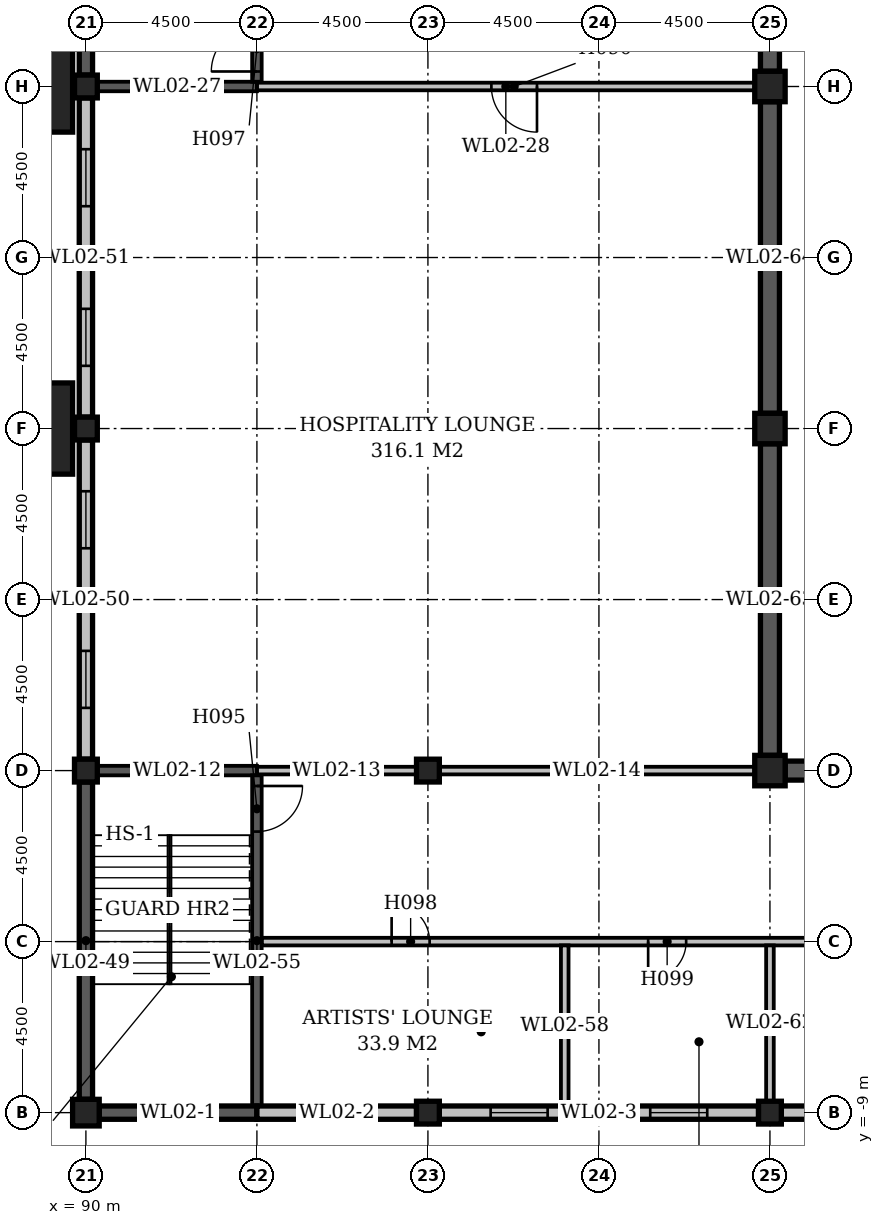
"""IFC4 building model, lengths in metres.
Left out: names, types, materials, properties, quantities, classifications, styles, units other than length and angle.
Written with IfcOpenShell. Run it as: python <this file> out.ifc"""

import sys

from ifc_helpers import new_model, si_unit, direction, frame, frame_2d, origin, origin_2d, place, context, subcontext, project, spatial, rectangle, extrude, element, fill, save


model = new_model("IFC4")
c1 = context("Model", 3, precision=1e-05, world=origin(), true_north=direction((0.0, 1.0)))
c2 = subcontext(c1, "Body", "Model", "MODEL_VIEW")
j1 = project(units=[si_unit("LENGTHUNIT", "METRE"), si_unit("PLANEANGLEUNIT", "RADIAN")], contexts=[c1])
p1 = place(None, origin())
s1 = spatial("IfcSite", under=j1, at=p1, CompositionType="ELEMENT")
p2 = place(p1, origin())
s2 = spatial("IfcBuilding", under=s1, at=p2, CompositionType="ELEMENT")
p3 = place(p2, frame((0.0, 0.0, 14.0)))
s3 = spatial("IfcBuildingStorey", under=s2, at=p3, CompositionType="ELEMENT", Elevation=14.0)
p4 = place(p3, frame((90.0, -9.0, 0.0), z_axis=(0.0, 0.0, 1.0), x_axis=(1.0, 0.0, 0.0)))
e1 = element("IfcColumn", 1, at=p4, inside=s3, PredefinedType="COLUMN", context=c2, shape_type="SweptSolid", body=[
    extrude(rectangle(XDim=0.7, YDim=0.7, at=origin_2d()), origin(), (0.0, 0.0, 1.0), 4.7),
])
for number, where, z_axis, x_axis in (
    (2, (90.0, 0.0, 0.0), (0.0, 0.0, 1.0), (1.0, 0.0, 0.0)),
    (3, (90.0, 9.0, 0.0), (0.0, 0.0, 1.0), (1.0, 0.0, 0.0)),
    (4, (90.0, 18.0, 0.0), (0.0, 0.0, 1.0), (1.0, 0.0, 0.0)),
    (5, (99.0, -9.0, 0.0), (0.0, 0.0, 1.0), (1.0, 0.0, 0.0)),
    (6, (99.0, 0.0, 0.0), (0.0, 0.0, 1.0), (1.0, 0.0, 0.0)),
    (7, (108.0, -9.0, 0.0), (0.0, 0.0, 1.0), (1.0, 0.0, 0.0)),
):
    element("IfcColumn", number, at=place(p3, frame(where, z_axis=z_axis, x_axis=x_axis)), inside=s3, PredefinedType="COLUMN", context=c2, shape_type="SweptSolid", body=[
        extrude(rectangle(XDim=0.6, YDim=0.6, at=origin_2d()), origin(), (0.0, 0.0, 1.0), 4.7),
    ])
for number, where, z_axis, x_axis in (
    (8, (108.0, 0.0, -0.3), (0.0, 0.0, 1.0), (1.0, 0.0, 0.0)),
    (9, (108.0, 9.0, -0.3), (0.0, 0.0, 1.0), (1.0, 0.0, 0.0)),
    (10, (108.0, 18.0, -0.3), (0.0, 0.0, 1.0), (1.0, 0.0, 0.0)),
):
    element("IfcColumn", number, at=place(p3, frame(where, z_axis=z_axis, x_axis=x_axis)), inside=s3, PredefinedType="COLUMN", context=c2, shape_type="SweptSolid", body=[
        extrude(rectangle(XDim=0.8, YDim=0.8, at=origin_2d()), origin(), (0.0, 0.0, 1.0), 5.0),
    ])
p5 = place(p3, frame((90.35, -9.0, 0.0), z_axis=(0.0, 0.0, 1.0), x_axis=(1.0, 0.0, 0.0)))
e11 = element("IfcWall", 11, at=p5, inside=s3, PredefinedType="STANDARD", context=c2, shape_type="SweptSolid", body=[
    extrude(rectangle(XDim=4.15, YDim=0.35, at=frame_2d((2.075, 0.0))), origin(), (0.0, 0.0, 1.0), 5.0),
])
p6 = place(p3, frame((94.5, -9.0, 0.0), z_axis=(0.0, 0.0, 1.0), x_axis=(1.0, 0.0, 0.0)))
e12 = element("IfcWall", 12, at=p6, inside=s3, PredefinedType="STANDARD", context=c2, shape_type="SweptSolid", body=[
    extrude(rectangle(XDim=4.2, YDim=0.35, at=frame_2d((2.1, 0.0))), origin(), (0.0, 0.0, 1.0), 4.1),
])
p7 = place(p6, frame((1.35, 0.0, 1.0)))
e13 = element("IfcOpeningElement", 13, at=p7, cuts=e12, PredefinedType="OPENING", context=c2, shape_type="SweptSolid", body=[
    extrude(rectangle(XDim=1.5, YDim=2.4, at=frame_2d((0.75, 1.2))), frame((0.0, 0.187, 0.0), z_axis=(0.0, -1.0, 0.0), x_axis=(1.0, 0.0, 0.0)), (0.0, 0.0, 1.0), 0.374),
])
p8 = place(p3, frame((99.3, -9.0, 0.0), z_axis=(0.0, 0.0, 1.0), x_axis=(1.0, 0.0, 0.0)))
e14 = element("IfcWall", 14, at=p8, inside=s3, PredefinedType="STANDARD", context=c2, shape_type="SweptSolid", body=[
    extrude(rectangle(XDim=8.4, YDim=0.35, at=frame_2d((4.2, 0.0))), origin(), (0.0, 0.0, 1.0), 4.1),
])
p9 = place(p8, frame((1.35, 0.0, 1.0)))
e15 = element("IfcOpeningElement", 15, at=p9, cuts=e14, PredefinedType="OPENING", context=c2, shape_type="SweptSolid", body=[
    extrude(rectangle(XDim=1.5, YDim=2.4, at=frame_2d((0.75, 1.2))), frame((0.0, 0.187, 0.0), z_axis=(0.0, -1.0, 0.0), x_axis=(1.0, 0.0, 0.0)), (0.0, 0.0, 1.0), 0.374),
])
p10 = place(p8, frame((5.55, 0.0, 1.0)))
e16 = element("IfcOpeningElement", 16, at=p10, cuts=e14, PredefinedType="OPENING", context=c2, shape_type="SweptSolid", body=[
    extrude(rectangle(XDim=1.5, YDim=2.4, at=frame_2d((0.75, 1.2))), frame((0.0, 0.187, 0.0), z_axis=(0.0, -1.0, 0.0), x_axis=(1.0, 0.0, 0.0)), (0.0, 0.0, 1.0), 0.374),
])
p11 = place(p3, frame((108.3, -9.0, 0.0), z_axis=(0.0, 0.0, 1.0), x_axis=(1.0, 0.0, 0.0)))
e17 = element("IfcWall", 17, at=p11, inside=s3, PredefinedType="STANDARD", context=c2, shape_type="SweptSolid", body=[
    extrude(rectangle(XDim=8.4, YDim=0.35, at=frame_2d((4.2, 0.0))), origin(), (0.0, 0.0, 1.0), 4.1),
])
p12 = place(p11, frame((1.35, 0.0, 1.0)))
e18 = element("IfcOpeningElement", 18, at=p12, cuts=e17, PredefinedType="OPENING", context=c2, shape_type="SweptSolid", body=[
    extrude(rectangle(XDim=1.5, YDim=2.4, at=frame_2d((0.75, 1.2))), frame((0.0, 0.187, 0.0), z_axis=(0.0, -1.0, 0.0), x_axis=(1.0, 0.0, 0.0)), (0.0, 0.0, 1.0), 0.374),
])
p13 = place(p11, frame((5.55, 0.0, 1.0)))
e19 = element("IfcOpeningElement", 19, at=p13, cuts=e17, PredefinedType="OPENING", context=c2, shape_type="SweptSolid", body=[
    extrude(rectangle(XDim=1.5, YDim=2.4, at=frame_2d((0.75, 1.2))), frame((0.0, 0.187, 0.0), z_axis=(0.0, -1.0, 0.0), x_axis=(1.0, 0.0, 0.0)), (0.0, 0.0, 1.0), 0.374),
])
p14 = place(p3, frame((94.625, -4.5, 0.0), z_axis=(0.0, 0.0, 1.0), x_axis=(1.0, 0.0, 0.0)))
e20 = element("IfcWall", 20, at=p14, inside=s3, PredefinedType="STANDARD", context=c2, shape_type="SweptSolid", body=[
    extrude(rectangle(XDim=44.875, YDim=0.2, at=frame_2d((22.438, 0.0))), origin(), (0.0, 0.0, 1.0), 4.7),
])
p15 = place(p14, frame((3.42, 0.0, 0.0)))
e21 = element("IfcOpeningElement", 21, at=p15, cuts=e20, PredefinedType="OPENING", context=c2, shape_type="SweptSolid", body=[
    extrude(rectangle(XDim=1.0, YDim=2.1, at=frame_2d((0.5, 1.05))), frame((0.0, 0.112, 0.0), z_axis=(0.0, -1.0, 0.0), x_axis=(1.0, 0.0, 0.0)), (0.0, 0.0, 1.0), 0.224),
])
p16 = place(p14, frame((10.17, 0.0, 0.0)))
e22 = element("IfcOpeningElement", 22, at=p16, cuts=e20, PredefinedType="OPENING", context=c2, shape_type="SweptSolid", body=[
    extrude(rectangle(XDim=1.0, YDim=2.1, at=frame_2d((0.5, 1.05))), frame((0.0, 0.112, 0.0), z_axis=(0.0, -1.0, 0.0), x_axis=(1.0, 0.0, 0.0)), (0.0, 0.0, 1.0), 0.224),
])
p17 = place(p14, frame((17.17, 0.0, 0.0)))
e23 = element("IfcOpeningElement", 23, at=p17, cuts=e20, PredefinedType="OPENING", context=c2, shape_type="SweptSolid", body=[
    extrude(rectangle(XDim=1.0, YDim=2.1, at=frame_2d((0.5, 1.05))), frame((0.0, 0.112, 0.0), z_axis=(0.0, -1.0, 0.0), x_axis=(1.0, 0.0, 0.0)), (0.0, 0.0, 1.0), 0.224),
])
p18 = place(p14, frame((24.82, 0.0, 0.0)))
e24 = element("IfcOpeningElement", 24, at=p18, cuts=e20, PredefinedType="OPENING", context=c2, shape_type="SweptSolid", body=[
    extrude(rectangle(XDim=1.0, YDim=2.1, at=frame_2d((0.5, 1.05))), frame((0.0, 0.112, 0.0), z_axis=(0.0, -1.0, 0.0), x_axis=(1.0, 0.0, 0.0)), (0.0, 0.0, 1.0), 0.224),
])
p19 = place(p14, frame((29.37, 0.0, 0.0)))
e25 = element("IfcOpeningElement", 25, at=p19, cuts=e20, PredefinedType="OPENING", context=c2, shape_type="SweptSolid", body=[
    extrude(rectangle(XDim=1.0, YDim=2.1, at=frame_2d((0.5, 1.05))), frame((0.0, 0.112, 0.0), z_axis=(0.0, -1.0, 0.0), x_axis=(1.0, 0.0, 0.0)), (0.0, 0.0, 1.0), 0.224),
])
p20 = place(p14, frame((33.87, 0.0, 0.0)))
e26 = element("IfcOpeningElement", 26, at=p20, cuts=e20, PredefinedType="OPENING", context=c2, shape_type="SweptSolid", body=[
    extrude(rectangle(XDim=1.0, YDim=2.1, at=frame_2d((0.5, 1.05))), frame((0.0, 0.112, 0.0), z_axis=(0.0, -1.0, 0.0), x_axis=(1.0, 0.0, 0.0)), (0.0, 0.0, 1.0), 0.224),
])
p21 = place(p14, frame((38.52, 0.0, 0.0)))
e27 = element("IfcOpeningElement", 27, at=p21, cuts=e20, PredefinedType="OPENING", context=c2, shape_type="SweptSolid", body=[
    extrude(rectangle(XDim=1.0, YDim=2.1, at=frame_2d((0.5, 1.05))), frame((0.0, 0.112, 0.0), z_axis=(0.0, -1.0, 0.0), x_axis=(1.0, 0.0, 0.0)), (0.0, 0.0, 1.0), 0.224),
])
p22 = place(p3, frame((90.3, 0.0, 0.0), z_axis=(0.0, 0.0, 1.0), x_axis=(1.0, 0.0, 0.0)))
e28 = element("IfcWall", 28, at=p22, inside=s3, PredefinedType="STANDARD", context=c2, shape_type="SweptSolid", body=[
    extrude(rectangle(XDim=4.2, YDim=0.25, at=frame_2d((2.1, 0.0))), origin(), (0.0, 0.0, 1.0), 5.0),
])
p23 = place(p3, frame((94.5, 0.0, 0.0), z_axis=(0.0, 0.0, 1.0), x_axis=(1.0, 0.0, 0.0)))
e29 = element("IfcWall", 29, at=p23, inside=s3, PredefinedType="STANDARD", context=c2, shape_type="SweptSolid", body=[
    extrude(rectangle(XDim=4.2, YDim=0.2, at=frame_2d((2.1, 0.0))), origin(), (0.0, 0.0, 1.0), 4.7),
])
p24 = place(p3, frame((99.3, 0.0, 0.0), z_axis=(0.0, 0.0, 1.0), x_axis=(1.0, 0.0, 0.0)))
e30 = element("IfcWall", 30, at=p24, inside=s3, PredefinedType="STANDARD", context=c2, shape_type="SweptSolid", body=[
    extrude(rectangle(XDim=8.3, YDim=0.2, at=frame_2d((4.15, 0.0))), origin(), (0.0, 0.0, 1.0), 4.7),
])
p25 = place(p3, frame((108.4, 0.0, 0.0), z_axis=(0.0, 0.0, 1.0), x_axis=(1.0, 0.0, 0.0)))
e31 = element("IfcWall", 31, at=p25, inside=s3, PredefinedType="STANDARD", context=c2, shape_type="SweptSolid", body=[
    extrude(rectangle(XDim=8.3, YDim=0.5, at=frame_2d((4.15, 0.0))), origin(), (0.0, 0.0, 1.0), 5.0),
])
p26 = place(p25, frame((4.72, 0.0, 0.0)))
e32 = element("IfcOpeningElement", 32, at=p26, cuts=e31, PredefinedType="OPENING", context=c2, shape_type="SweptSolid", body=[
    extrude(rectangle(XDim=1.8, YDim=2.4, at=frame_2d((0.9, 1.2))), frame((0.0, 0.262, 0.0), z_axis=(0.0, -1.0, 0.0), x_axis=(1.0, 0.0, 0.0)), (0.0, 0.0, 1.0), 0.524),
])
p27 = place(p3, frame((90.3, 18.0, 0.0), z_axis=(0.0, 0.0, 1.0), x_axis=(1.0, 0.0, 0.0)))
e33 = element("IfcWall", 33, at=p27, inside=s3, PredefinedType="STANDARD", context=c2, shape_type="SweptSolid", body=[
    extrude(rectangle(XDim=4.2, YDim=0.25, at=frame_2d((2.1, 0.0))), origin(), (0.0, 0.0, 1.0), 5.0),
])
p28 = place(p3, frame((94.5, 18.0, 0.0), z_axis=(0.0, 0.0, 1.0), x_axis=(1.0, 0.0, 0.0)))
e34 = element("IfcWall", 34, at=p28, inside=s3, PredefinedType="STANDARD", context=c2, shape_type="SweptSolid", body=[
    extrude(rectangle(XDim=13.1, YDim=0.2, at=frame_2d((6.55, 0.0))), origin(), (0.0, 0.0, 1.0), 3.3),
])
p29 = place(p28, frame((6.17, 0.0, 0.0)))
e35 = element("IfcOpeningElement", 35, at=p29, cuts=e34, PredefinedType="OPENING", context=c2, shape_type="SweptSolid", body=[
    extrude(rectangle(XDim=1.2, YDim=2.1, at=frame_2d((0.6, 1.05))), frame((0.0, 0.112, 0.0), z_axis=(0.0, -1.0, 0.0), x_axis=(1.0, 0.0, 0.0)), (0.0, 0.0, 1.0), 0.224),
])
p30 = place(p3, frame((90.0, -8.65, 0.0), z_axis=(0.0, 0.0, 1.0), x_axis=(0.0, 1.0, 0.0)))
e36 = element("IfcWall", 36, at=p30, inside=s3, PredefinedType="STANDARD", context=c2, shape_type="SweptSolid", body=[
    extrude(rectangle(XDim=8.35, YDim=0.35, at=frame_2d((4.175, 0.0))), origin(), (0.0, 0.0, 1.0), 5.0),
])
p31 = place(p3, frame((90.0, 0.3, 0.0), z_axis=(0.0, 0.0, 1.0), x_axis=(0.0, 1.0, 0.0)))
e37 = element("IfcWall", 37, at=p31, inside=s3, PredefinedType="STANDARD", context=c2, shape_type="SweptSolid", body=[
    extrude(rectangle(XDim=8.4, YDim=0.35, at=frame_2d((4.2, 0.0))), origin(), (0.0, 0.0, 1.0), 4.1),
])
p32 = place(p31, frame((1.35, 0.0, 1.0)))
e38 = element("IfcOpeningElement", 38, at=p32, cuts=e37, PredefinedType="OPENING", context=c2, shape_type="SweptSolid", body=[
    extrude(rectangle(XDim=1.5, YDim=2.4, at=frame_2d((0.75, 1.2))), frame((0.0, 0.187, 0.0), z_axis=(0.0, -1.0, 0.0), x_axis=(1.0, 0.0, 0.0)), (0.0, 0.0, 1.0), 0.374),
])
p33 = place(p31, frame((5.55, 0.0, 1.0)))
e39 = element("IfcOpeningElement", 39, at=p33, cuts=e37, PredefinedType="OPENING", context=c2, shape_type="SweptSolid", body=[
    extrude(rectangle(XDim=1.5, YDim=2.4, at=frame_2d((0.75, 1.2))), frame((0.0, 0.187, 0.0), z_axis=(0.0, -1.0, 0.0), x_axis=(1.0, 0.0, 0.0)), (0.0, 0.0, 1.0), 0.374),
])
p34 = place(p3, frame((90.0, 9.3, 0.0), z_axis=(0.0, 0.0, 1.0), x_axis=(0.0, 1.0, 0.0)))
e40 = element("IfcWall", 40, at=p34, inside=s3, PredefinedType="STANDARD", context=c2, shape_type="SweptSolid", body=[
    extrude(rectangle(XDim=8.4, YDim=0.35, at=frame_2d((4.2, 0.0))), origin(), (0.0, 0.0, 1.0), 4.1),
])
p35 = place(p34, frame((1.35, 0.0, 1.0)))
e41 = element("IfcOpeningElement", 41, at=p35, cuts=e40, PredefinedType="OPENING", context=c2, shape_type="SweptSolid", body=[
    extrude(rectangle(XDim=1.5, YDim=2.4, at=frame_2d((0.75, 1.2))), frame((0.0, 0.187, 0.0), z_axis=(0.0, -1.0, 0.0), x_axis=(1.0, 0.0, 0.0)), (0.0, 0.0, 1.0), 0.374),
])
p36 = place(p34, frame((5.55, 0.0, 1.0)))
e42 = element("IfcOpeningElement", 42, at=p36, cuts=e40, PredefinedType="OPENING", context=c2, shape_type="SweptSolid", body=[
    extrude(rectangle(XDim=1.5, YDim=2.4, at=frame_2d((0.75, 1.2))), frame((0.0, 0.187, 0.0), z_axis=(0.0, -1.0, 0.0), x_axis=(1.0, 0.0, 0.0)), (0.0, 0.0, 1.0), 0.374),
])
p37 = place(p3, frame((90.0, 18.3, 0.0), z_axis=(0.0, 0.0, 1.0), x_axis=(0.0, 1.0, 0.0)))
e43 = element("IfcWall", 43, at=p37, inside=s3, PredefinedType="STANDARD", context=c2, shape_type="SweptSolid", body=[
    extrude(rectangle(XDim=8.4, YDim=0.35, at=frame_2d((4.2, 0.0))), origin(), (0.0, 0.0, 1.0), 5.0),
])
p38 = place(p3, frame((94.5, -8.825, 0.0), z_axis=(0.0, 0.0, 1.0), x_axis=(0.0, 1.0, 0.0)))
e44 = element("IfcWall", 44, at=p38, inside=s3, PredefinedType="STANDARD", context=c2, shape_type="SweptSolid", body=[
    extrude(rectangle(XDim=8.7, YDim=0.25, at=frame_2d((4.35, 0.0))), origin(), (0.0, 0.0, 1.0), 5.0),
])
p39 = place(p38, frame((7.22, 0.0, 0.0)))
e45 = element("IfcOpeningElement", 45, at=p39, cuts=e44, PredefinedType="OPENING", context=c2, shape_type="SweptSolid", body=[
    extrude(rectangle(XDim=1.2, YDim=2.1, at=frame_2d((0.6, 1.05))), frame((0.0, 0.137, 0.0), z_axis=(0.0, -1.0, 0.0), x_axis=(1.0, 0.0, 0.0)), (0.0, 0.0, 1.0), 0.274),
])
p40 = place(p3, frame((94.5, 18.125, 0.0), z_axis=(0.0, 0.0, 1.0), x_axis=(0.0, 1.0, 0.0)))
e46 = element("IfcWall", 46, at=p40, inside=s3, PredefinedType="STANDARD", context=c2, shape_type="SweptSolid", body=[
    extrude(rectangle(XDim=8.75, YDim=0.25, at=frame_2d((4.375, 0.0))), origin(), (0.0, 0.0, 1.0), 5.0),
])
p41 = place(p40, frame((0.27, 0.0, 0.0)))
e47 = element("IfcOpeningElement", 47, at=p41, cuts=e46, PredefinedType="OPENING", context=c2, shape_type="SweptSolid", body=[
    extrude(rectangle(XDim=1.2, YDim=2.1, at=frame_2d((0.6, 1.05))), frame((0.0, 0.137, 0.0), z_axis=(0.0, -1.0, 0.0), x_axis=(1.0, 0.0, 0.0)), (0.0, 0.0, 1.0), 0.274),
])
p42 = place(p3, frame((102.6, -8.825, 0.0), z_axis=(0.0, 0.0, 1.0), x_axis=(0.0, 1.0, 0.0)))
e48 = element("IfcWall", 48, at=p42, inside=s3, PredefinedType="STANDARD", context=c2, shape_type="SweptSolid", body=[
    extrude(rectangle(XDim=4.225, YDim=0.2, at=frame_2d((2.112, 0.0))), origin(), (0.0, 0.0, 1.0), 4.7),
])
p43 = place(p3, frame((108.0, -8.7, 0.0), z_axis=(0.0, 0.0, 1.0), x_axis=(0.0, 1.0, 0.0)))
e49 = element("IfcWall", 49, at=p43, inside=s3, PredefinedType="STANDARD", context=c2, shape_type="SweptSolid", body=[
    extrude(rectangle(XDim=4.1, YDim=0.2, at=frame_2d((2.05, 0.0))), origin(), (0.0, 0.0, 1.0), 4.7),
])
for number, where, z_axis, x_axis in (
    (50, (108.0, 0.4, 0.0), (0.0, 0.0, 1.0), (0.0, 1.0, 0.0)),
    (51, (108.0, 9.4, 0.0), (0.0, 0.0, 1.0), (0.0, 1.0, 0.0)),
):
    element("IfcWall", number, at=place(p3, frame(where, z_axis=z_axis, x_axis=x_axis)), inside=s3, PredefinedType="STANDARD", context=c2, shape_type="SweptSolid", body=[
        extrude(rectangle(XDim=8.2, YDim=0.5, at=frame_2d((4.1, 0.0))), origin(), (0.0, 0.0, 1.0), 5.0),
    ])
p44 = place(p3, frame((108.0, 18.4, 0.0), z_axis=(0.0, 0.0, 1.0), x_axis=(0.0, 1.0, 0.0)))
e52 = element("IfcWall", 52, at=p44, inside=s3, PredefinedType="STANDARD", context=c2, shape_type="SweptSolid", body=[
    extrude(rectangle(XDim=8.2, YDim=0.5, at=frame_2d((4.1, 0.0))), origin(), (0.0, 0.0, 1.0), 5.0),
])
p45 = place(p44, frame((3.22, 0.0, 0.0)))
e53 = element("IfcOpeningElement", 53, at=p45, cuts=e52, PredefinedType="OPENING", context=c2, shape_type="SweptSolid", body=[
    extrude(rectangle(XDim=1.8, YDim=2.4, at=frame_2d((0.9, 1.2))), frame((0.0, 0.262, 0.0), z_axis=(0.0, -1.0, 0.0), x_axis=(1.0, 0.0, 0.0)), (0.0, 0.0, 1.0), 0.524),
])
for number, where, z_axis, x_axis in (
    (54, (88.85, 9.0, 0.0), (0.0, 0.0, 1.0), (1.0, 0.0, 0.0)),
    (55, (88.85, 18.0, 0.0), (0.0, 0.0, 1.0), (1.0, 0.0, 0.0)),
):
    element("IfcColumn", number, at=place(p3, frame(where, z_axis=z_axis, x_axis=x_axis)), inside=s3, PredefinedType="COLUMN", context=c2, shape_type="SweptSolid", body=[
        extrude(rectangle(XDim=1.6, YDim=2.4, at=origin_2d()), origin(), (0.0, 0.0, 1.0), 5.0),
    ])
p46 = place(p29, origin())
e56 = element("IfcDoor", 56, at=p46, inside=s3, OperationType="SINGLE_SWING_RIGHT", PredefinedType="DOOR", context=c2, shape_type="SweptSolid", body=[
    extrude(rectangle(XDim=1.2, YDim=2.1, at=frame_2d((0.6, 1.05))), frame((0.0, 0.025, 0.0), z_axis=(0.0, -1.0, 0.0), x_axis=(1.0, 0.0, 0.0)), (0.0, 0.0, 1.0), 0.05),
])
fill(e35, e56)
p47 = place(p39, origin())
e57 = element("IfcDoor", 57, at=p47, inside=s3, OperationType="SINGLE_SWING_RIGHT", PredefinedType="DOOR", context=c2, shape_type="SweptSolid", body=[
    extrude(rectangle(XDim=1.2, YDim=2.1, at=frame_2d((0.6, 1.05))), frame((0.0, 0.025, 0.0), z_axis=(0.0, -1.0, 0.0), x_axis=(1.0, 0.0, 0.0)), (0.0, 0.0, 1.0), 0.05),
])
fill(e45, e57)
p48 = place(p41, origin())
e58 = element("IfcDoor", 58, at=p48, inside=s3, OperationType="SINGLE_SWING_LEFT", PredefinedType="DOOR", context=c2, shape_type="SweptSolid", body=[
    extrude(rectangle(XDim=1.2, YDim=2.1, at=frame_2d((0.6, 1.05))), frame((0.0, 0.025, 0.0), z_axis=(0.0, -1.0, 0.0), x_axis=(1.0, 0.0, 0.0)), (0.0, 0.0, 1.0), 0.05),
])
fill(e47, e58)
p49 = place(p15, origin())
e59 = element("IfcDoor", 59, at=p49, inside=s3, OperationType="SINGLE_SWING_LEFT", PredefinedType="DOOR", context=c2, shape_type="SweptSolid", body=[
    extrude(rectangle(XDim=1.0, YDim=2.1, at=frame_2d((0.5, 1.05))), frame((0.0, 0.025, 0.0), z_axis=(0.0, -1.0, 0.0), x_axis=(1.0, 0.0, 0.0)), (0.0, 0.0, 1.0), 0.05),
])
fill(e21, e59)
p50 = place(p16, frame((1.0, 0.0, 0.0), z_axis=(0.0, 0.0, 1.0), x_axis=(-1.0, 0.0, 0.0)))
e60 = element("IfcDoor", 60, at=p50, inside=s3, OperationType="SINGLE_SWING_RIGHT", PredefinedType="DOOR", context=c2, shape_type="SweptSolid", body=[
    extrude(rectangle(XDim=1.0, YDim=2.1, at=frame_2d((0.5, 1.05))), frame((0.0, 0.025, 0.0), z_axis=(0.0, -1.0, 0.0), x_axis=(1.0, 0.0, 0.0)), (0.0, 0.0, 1.0), 0.05),
])
fill(e22, e60)
p51 = place(p7, origin())
e61 = element("IfcWindow", 61, at=p51, inside=s3, PartitioningType="SINGLE_PANEL", PredefinedType="WINDOW", context=c2, shape_type="SweptSolid", body=[
    extrude(rectangle(XDim=1.5, YDim=2.4, at=frame_2d((0.75, 1.2))), frame((0.0, 0.03, 0.0), z_axis=(0.0, -1.0, 0.0), x_axis=(1.0, 0.0, 0.0)), (0.0, 0.0, 1.0), 0.06),
])
fill(e13, e61)
p52 = place(p9, origin())
e62 = element("IfcWindow", 62, at=p52, inside=s3, PartitioningType="SINGLE_PANEL", PredefinedType="WINDOW", context=c2, shape_type="SweptSolid", body=[
    extrude(rectangle(XDim=1.5, YDim=2.4, at=frame_2d((0.75, 1.2))), frame((0.0, 0.03, 0.0), z_axis=(0.0, -1.0, 0.0), x_axis=(1.0, 0.0, 0.0)), (0.0, 0.0, 1.0), 0.06),
])
fill(e15, e62)
p53 = place(p10, origin())
e63 = element("IfcWindow", 63, at=p53, inside=s3, PartitioningType="SINGLE_PANEL", PredefinedType="WINDOW", context=c2, shape_type="SweptSolid", body=[
    extrude(rectangle(XDim=1.5, YDim=2.4, at=frame_2d((0.75, 1.2))), frame((0.0, 0.03, 0.0), z_axis=(0.0, -1.0, 0.0), x_axis=(1.0, 0.0, 0.0)), (0.0, 0.0, 1.0), 0.06),
])
fill(e16, e63)
p54 = place(p32, origin())
e64 = element("IfcWindow", 64, at=p54, inside=s3, PartitioningType="SINGLE_PANEL", PredefinedType="WINDOW", context=c2, shape_type="SweptSolid", body=[
    extrude(rectangle(XDim=1.5, YDim=2.4, at=frame_2d((0.75, 1.2))), frame((0.0, 0.03, 0.0), z_axis=(0.0, -1.0, 0.0), x_axis=(1.0, 0.0, 0.0)), (0.0, 0.0, 1.0), 0.06),
])
fill(e38, e64)
p55 = place(p33, origin())
e65 = element("IfcWindow", 65, at=p55, inside=s3, PartitioningType="SINGLE_PANEL", PredefinedType="WINDOW", context=c2, shape_type="SweptSolid", body=[
    extrude(rectangle(XDim=1.5, YDim=2.4, at=frame_2d((0.75, 1.2))), frame((0.0, 0.03, 0.0), z_axis=(0.0, -1.0, 0.0), x_axis=(1.0, 0.0, 0.0)), (0.0, 0.0, 1.0), 0.06),
])
fill(e39, e65)
p56 = place(p35, origin())
e66 = element("IfcWindow", 66, at=p56, inside=s3, PartitioningType="SINGLE_PANEL", PredefinedType="WINDOW", context=c2, shape_type="SweptSolid", body=[
    extrude(rectangle(XDim=1.5, YDim=2.4, at=frame_2d((0.75, 1.2))), frame((0.0, 0.03, 0.0), z_axis=(0.0, -1.0, 0.0), x_axis=(1.0, 0.0, 0.0)), (0.0, 0.0, 1.0), 0.06),
])
fill(e41, e66)
p57 = place(p36, origin())
e67 = element("IfcWindow", 67, at=p57, inside=s3, PartitioningType="SINGLE_PANEL", PredefinedType="WINDOW", context=c2, shape_type="SweptSolid", body=[
    extrude(rectangle(XDim=1.5, YDim=2.4, at=frame_2d((0.75, 1.2))), frame((0.0, 0.03, 0.0), z_axis=(0.0, -1.0, 0.0), x_axis=(1.0, 0.0, 0.0)), (0.0, 0.0, 1.0), 0.06),
])
fill(e42, e67)
save(model, sys.argv[1])
